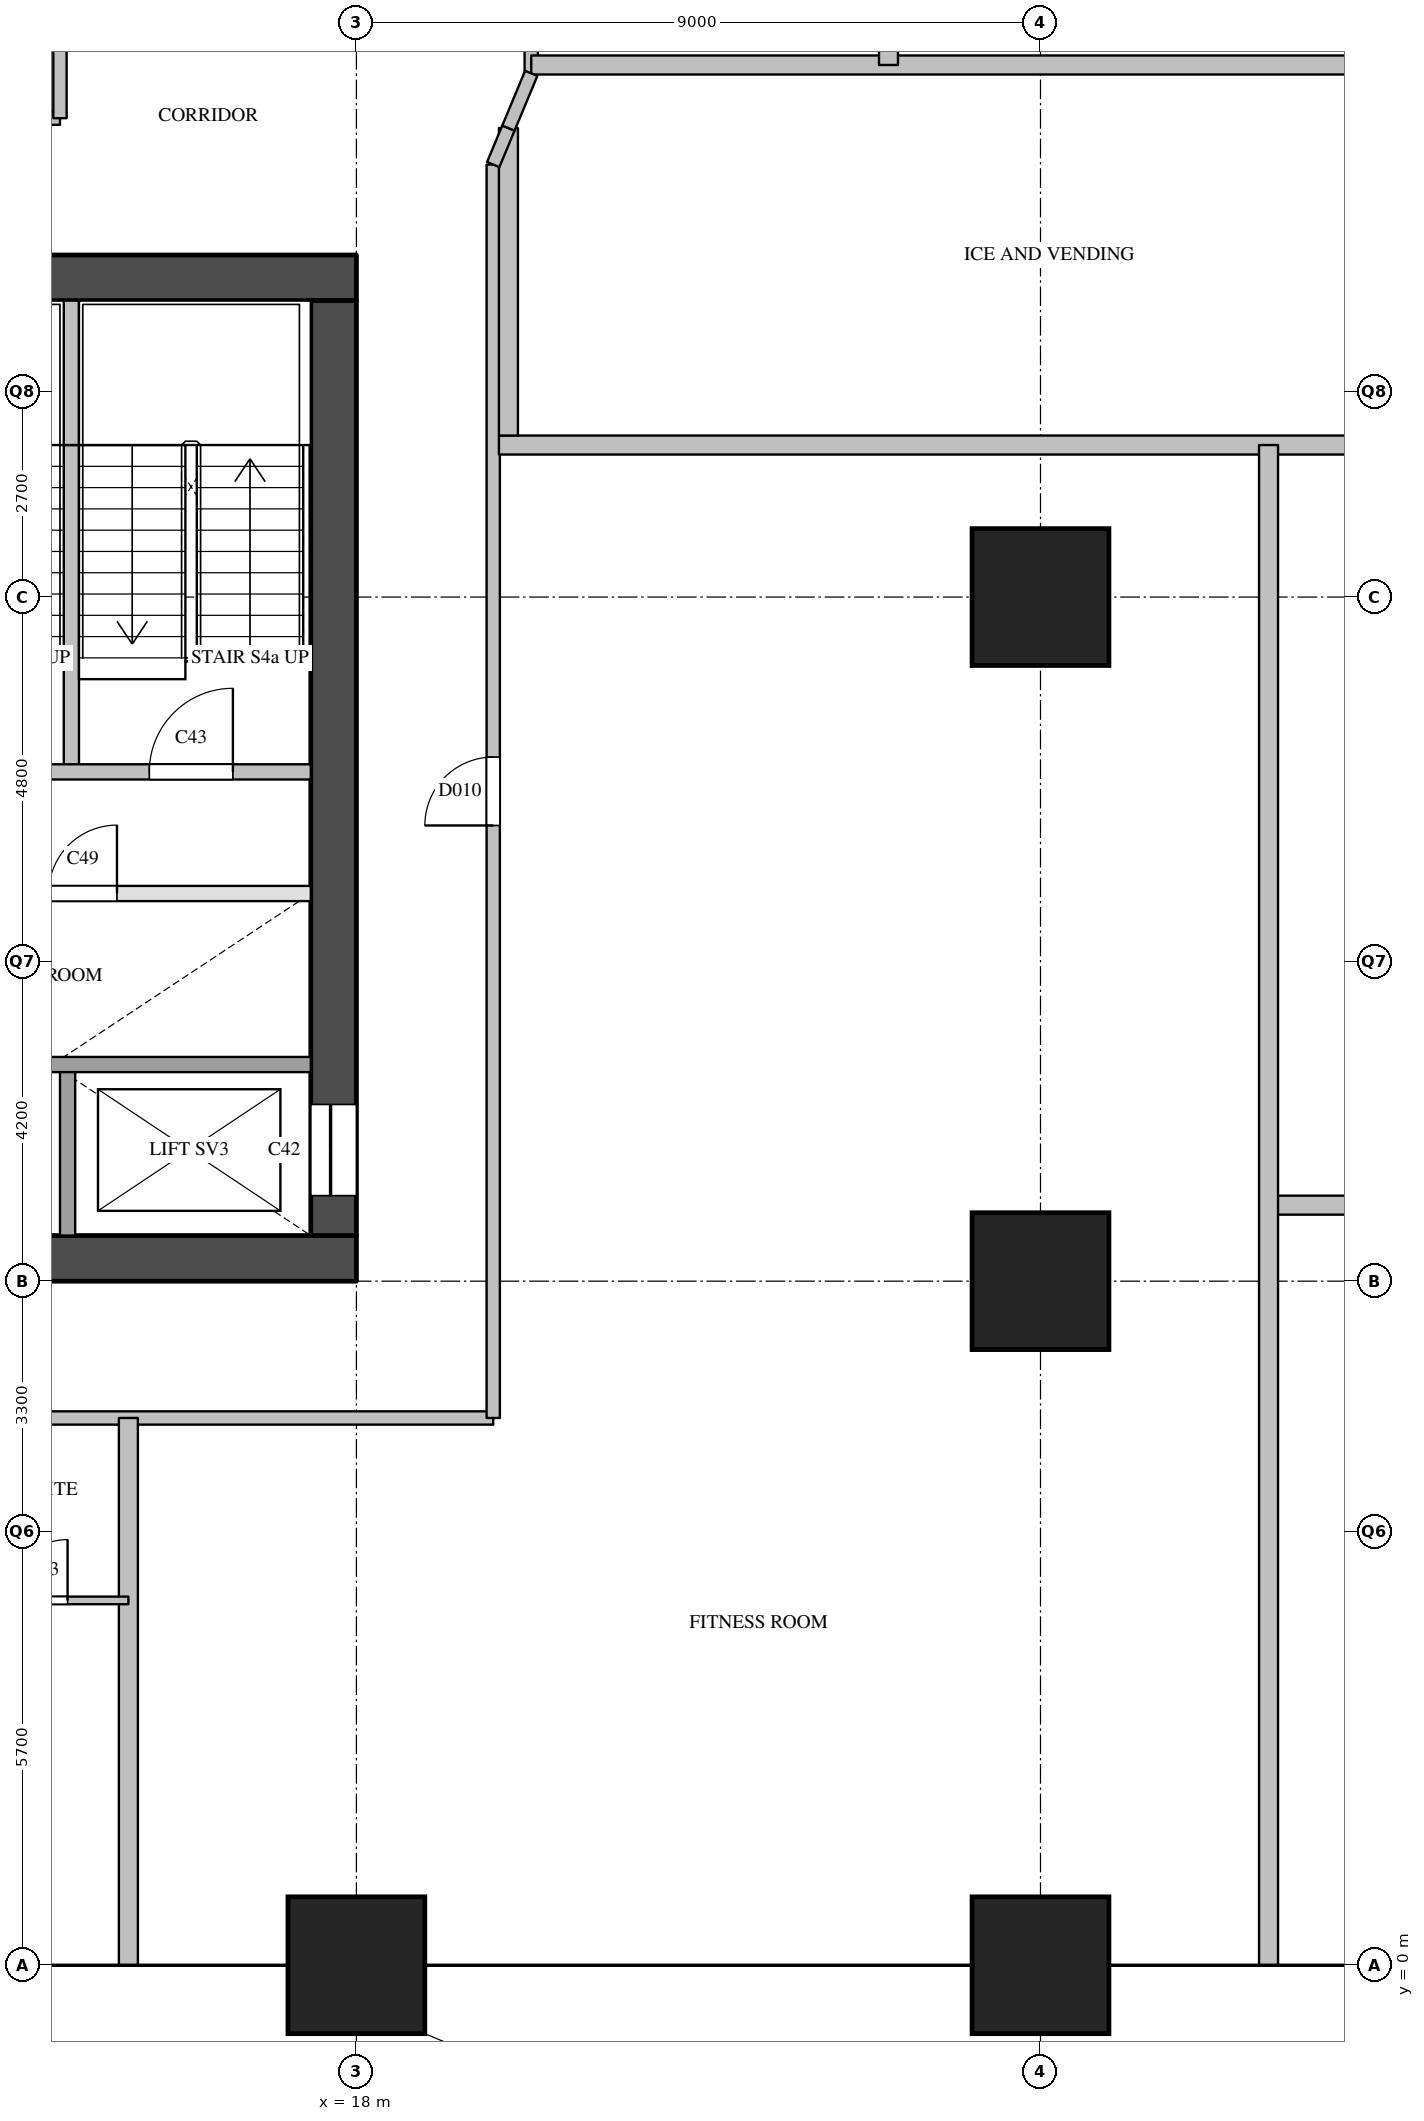
"""IFC4 building model, lengths in metres.
Left out: names, types, materials, properties, quantities, classifications, styles, units other than length and angle.
Written with IfcOpenShell. Run it as: python <this file> out.ifc"""

import sys

from ifc_helpers import new_model, si_unit, direction, frame, frame_2d, origin, origin_2d, place, context, subcontext, project, spatial, rectangle, extrude, element, fill, save


model = new_model("IFC4")
c1 = context("Model", 3, precision=1e-05, world=origin(), true_north=direction((0.0, 1.0)))
c2 = subcontext(c1, "Body", "Model", "MODEL_VIEW")
j1 = project(units=[si_unit("LENGTHUNIT", "METRE"), si_unit("PLANEANGLEUNIT", "RADIAN")], contexts=[c1])
p1 = place(None, origin())
s1 = spatial("IfcSite", under=j1, at=p1, CompositionType="ELEMENT")
p2 = place(p1, origin())
s2 = spatial("IfcBuilding", under=s1, at=p2, CompositionType="ELEMENT")
p3 = place(p2, frame((0.0, 0.0, 42.4)))
s3 = spatial("IfcBuildingStorey", under=s2, at=p3, CompositionType="ELEMENT", Elevation=42.4)
for number, where, z_axis, x_axis in (
    (1, (18.0, 0.0, 0.0), (0.0, 0.0, 1.0), (1.0, 0.0, 0.0)),
    (2, (27.0, 0.0, 0.0), (0.0, 0.0, 1.0), (1.0, 0.0, 0.0)),
    (3, (27.0, 9.0, 0.0), (0.0, 0.0, 1.0), (1.0, 0.0, 0.0)),
    (4, (27.0, 18.0, 0.0), (0.0, 0.0, 1.0), (1.0, 0.0, 0.0)),
):
    element("IfcColumn", number, at=place(p3, frame(where, z_axis=z_axis, x_axis=x_axis)), inside=s3, PredefinedType="COLUMN", context=c2, shape_type="SweptSolid", body=[
        extrude(rectangle(XDim=1.8, YDim=1.8, at=origin_2d()), origin(), (0.0, 0.0, 1.0), 3.8),
    ])
for number, where, z_axis, x_axis in (
    (5, (9.0, 9.3, 0.0), (0.0, 0.0, 1.0), (1.0, 0.0, 0.0)),
    (6, (9.0, 22.2, 0.0), (0.0, 0.0, 1.0), (1.0, 0.0, 0.0)),
):
    element("IfcWall", number, at=place(p3, frame(where, z_axis=z_axis, x_axis=x_axis)), inside=s3, PredefinedType="SHEAR", context=c2, shape_type="SweptSolid", body=[
        extrude(rectangle(XDim=9.0, YDim=0.6, at=frame_2d((4.5, 0.0))), origin(), (0.0, 0.0, 1.0), 3.5),
    ])
p4 = place(p3, frame((17.7, 9.6, 0.0), z_axis=(0.0, 0.0, 1.0), x_axis=(0.0, 1.0, 0.0)))
e7 = element("IfcWall", 7, at=p4, inside=s3, PredefinedType="SHEAR", context=c2, shape_type="SweptSolid", body=[
    extrude(rectangle(XDim=12.3, YDim=0.6, at=frame_2d((6.15, 0.0))), origin(), (0.0, 0.0, 1.0), 3.5),
])
p5 = place(p4, frame((0.525, 0.0, 0.0)))
e8 = element("IfcOpeningElement", 8, at=p5, cuts=e7, PredefinedType="OPENING", context=c2, shape_type="SweptSolid", body=[
    extrude(rectangle(XDim=1.2, YDim=2.1, at=frame_2d((0.6, 1.05))), frame((0.0, 0.31, 0.0), z_axis=(0.0, -1.0, 0.0), x_axis=(1.0, 0.0, 0.0)), (0.0, 0.0, 1.0), 0.62),
])
p6 = place(p3, frame((14.2, 9.6, 0.0), z_axis=(0.0, 0.0, 1.0), x_axis=(0.0, 1.0, 0.0)))
e9 = element("IfcWall", 9, at=p6, inside=s3, PredefinedType="SOLIDWALL", context=c2, shape_type="SweptSolid", body=[
    extrude(rectangle(XDim=2.3, YDim=0.2, at=frame_2d((1.15, 0.0))), origin(), (0.0, 0.0, 1.0), 3.5),
])
p7 = place(p3, frame((14.25, 15.7, 0.0), z_axis=(0.0, 0.0, 1.0), x_axis=(0.0, 1.0, 0.0)))
e10 = element("IfcWall", 10, at=p7, inside=s3, PredefinedType="SOLIDWALL", context=c2, shape_type="SweptSolid", body=[
    extrude(rectangle(XDim=4.3, YDim=0.2, at=frame_2d((2.15, 0.0))), origin(), (0.0, 0.0, 1.0), 3.5),
])
p8 = place(p3, frame((14.25, 20.0, 0.0), z_axis=(0.0, 0.0, 1.0), x_axis=(0.0, 1.0, 0.0)))
e11 = element("IfcWall", 11, at=p8, inside=s3, PredefinedType="SOLIDWALL", context=c2, shape_type="SweptSolid", body=[
    extrude(rectangle(XDim=1.9, YDim=0.2, at=frame_2d((0.95, 0.0))), origin(), (0.0, 0.0, 1.0), 3.5),
])
p9 = place(p3, frame((9.6, 11.85, 0.0), z_axis=(0.0, 0.0, 1.0), x_axis=(1.0, 0.0, 0.0)))
e12 = element("IfcWall", 12, at=p9, inside=s3, PredefinedType="SOLIDWALL", context=c2, shape_type="SweptSolid", body=[
    extrude(rectangle(XDim=7.8, YDim=0.2, at=frame_2d((3.9, 0.0))), origin(), (0.0, 0.0, 1.0), 3.5),
])
p10 = place(p3, frame((11.4, 14.1, 0.0), z_axis=(0.0, 0.0, 1.0), x_axis=(1.0, 0.0, 0.0)))
e13 = element("IfcWall", 13, at=p10, inside=s3, PredefinedType="PARTITIONING", context=c2, shape_type="SweptSolid", body=[
    extrude(rectangle(XDim=6.0, YDim=0.2, at=frame_2d((3.0, 0.0))), origin(), (0.0, 0.0, 1.0), 3.5),
])
p11 = place(p10, frame((2.55, 0.0, 0.0)))
e14 = element("IfcOpeningElement", 14, at=p11, cuts=e13, PredefinedType="OPENING", context=c2, shape_type="SweptSolid", body=[
    extrude(rectangle(XDim=0.9, YDim=2.1, at=frame_2d((0.45, 1.05))), frame((0.0, 0.11, 0.0), z_axis=(0.0, -1.0, 0.0), x_axis=(1.0, 0.0, 0.0)), (0.0, 0.0, 1.0), 0.22),
])
p12 = place(p3, frame((11.1, 15.7, 0.0), z_axis=(0.0, 0.0, 1.0), x_axis=(1.0, 0.0, 0.0)))
e15 = element("IfcWall", 15, at=p12, inside=s3, PredefinedType="SOLIDWALL", context=c2, shape_type="SweptSolid", body=[
    extrude(rectangle(XDim=6.3, YDim=0.2, at=frame_2d((3.15, 0.0))), origin(), (0.0, 0.0, 1.0), 3.5),
])
p13 = place(p12, frame((4.175, 0.0, 0.0)))
e16 = element("IfcOpeningElement", 16, at=p13, cuts=e15, PredefinedType="OPENING", context=c2, shape_type="SweptSolid", body=[
    extrude(rectangle(XDim=1.1, YDim=2.1, at=frame_2d((0.55, 1.05))), frame((0.0, 0.11, 0.0), z_axis=(0.0, -1.0, 0.0), x_axis=(1.0, 0.0, 0.0)), (0.0, 0.0, 1.0), 0.22),
])
p14 = place(p12, frame((1.025, 0.0, 0.0)))
e17 = element("IfcOpeningElement", 17, at=p14, cuts=e15, PredefinedType="OPENING", context=c2, shape_type="SweptSolid", body=[
    extrude(rectangle(XDim=1.1, YDim=2.1, at=frame_2d((0.55, 1.05))), frame((0.0, 0.11, 0.0), z_axis=(0.0, -1.0, 0.0), x_axis=(1.0, 0.0, 0.0)), (0.0, 0.0, 1.0), 0.22),
])
p15 = place(p3, frame((7.2, 7.2, 0.0), z_axis=(0.0, 0.0, 1.0), x_axis=(1.0, 0.0, 0.0)))
e18 = element("IfcWall", 18, at=p15, inside=s3, PredefinedType="PARTITIONING", context=c2, shape_type="SweptSolid", body=[
    extrude(rectangle(XDim=12.6, YDim=0.175, at=frame_2d((6.3, 0.0))), origin(), (0.0, 0.0, 1.0), 3.5),
])
p16 = place(p15, frame((3.6, 0.0, 0.0)))
e19 = element("IfcOpeningElement", 19, at=p16, cuts=e18, PredefinedType="OPENING", context=c2, shape_type="SweptSolid", body=[
    extrude(rectangle(XDim=1.0, YDim=2.1, at=frame_2d((0.5, 1.05))), frame((0.0, 0.097, 0.0), z_axis=(0.0, -1.0, 0.0), x_axis=(1.0, 0.0, 0.0)), (0.0, 0.0, 1.0), 0.195),
])
p17 = place(p15, frame((0.95, 0.0, 0.0)))
e20 = element("IfcOpeningElement", 20, at=p17, cuts=e18, PredefinedType="OPENING", context=c2, shape_type="SweptSolid", body=[
    extrude(rectangle(XDim=0.9, YDim=2.1, at=frame_2d((0.45, 1.05))), frame((0.0, 0.097, 0.0), z_axis=(0.0, -1.0, 0.0), x_axis=(1.0, 0.0, 0.0)), (0.0, 0.0, 1.0), 0.195),
])
p18 = place(p3, frame((11.32, 24.3, 0.0), z_axis=(0.0, 0.0, 1.0), x_axis=(1.0, 0.0, 0.0)))
e21 = element("IfcWall", 21, at=p18, inside=s3, PredefinedType="PARTITIONING", context=c2, shape_type="SweptSolid", body=[
    extrude(rectangle(XDim=2.78, YDim=0.175, at=frame_2d((1.39, 0.0))), origin(), (0.0, 0.0, 1.0), 3.5),
])
p19 = place(p18, frame((0.89, 0.0, 0.0)))
e22 = element("IfcOpeningElement", 22, at=p19, cuts=e21, PredefinedType="OPENING", context=c2, shape_type="SweptSolid", body=[
    extrude(rectangle(XDim=1.0, YDim=2.1, at=frame_2d((0.5, 1.05))), frame((0.0, 0.097, 0.0), z_axis=(0.0, -1.0, 0.0), x_axis=(1.0, 0.0, 0.0)), (0.0, 0.0, 1.0), 0.195),
])
p20 = place(p3, frame((14.1, 24.3, 0.0), z_axis=(0.0, 0.0, 1.0), x_axis=(0.0, 1.0, 0.0)))
e23 = element("IfcWall", 23, at=p20, inside=s3, PredefinedType="PARTITIONING", context=c2, shape_type="SweptSolid", body=[
    extrude(rectangle(XDim=2.4, YDim=0.175, at=frame_2d((1.2, 0.0))), origin(), (0.0, 0.0, 1.0), 2.5),
])
p21 = place(p3, frame((19.8, 7.2, 0.0), z_axis=(0.0, 0.0, 1.0), x_axis=(0.0, 1.0, 0.0)))
e24 = element("IfcWall", 24, at=p21, inside=s3, PredefinedType="PARTITIONING", context=c2, shape_type="SweptSolid", body=[
    extrude(rectangle(XDim=16.49, YDim=0.175, at=frame_2d((8.245, 0.0))), origin(), (0.0, 0.0, 1.0), 3.5),
])
p22 = place(p21, frame((7.795, 0.0, 0.0)))
e25 = element("IfcOpeningElement", 25, at=p22, cuts=e24, PredefinedType="OPENING", context=c2, shape_type="SweptSolid", body=[
    extrude(rectangle(XDim=0.9, YDim=2.1, at=frame_2d((0.45, 1.05))), frame((0.0, 0.097, 0.0), z_axis=(0.0, -1.0, 0.0), x_axis=(1.0, 0.0, 0.0)), (0.0, 0.0, 1.0), 0.195),
])
p23 = place(p3, frame((20.3, 24.89, 0.0), z_axis=(0.0, 0.0, 1.0), x_axis=(0.0, 1.0, 0.0)))
e26 = element("IfcWall", 26, at=p23, inside=s3, PredefinedType="PARTITIONING", context=c2, shape_type="SweptSolid", body=[
    extrude(rectangle(XDim=3.03, YDim=0.175, at=frame_2d((1.515, 0.0))), origin(), (0.0, 0.0, 1.0), 2.5),
])
p24 = place(p3, frame((30.0, 10.0, 0.0), z_axis=(0.0, 0.0, 1.0), x_axis=(1.0, 0.0, 0.0)))
e27 = element("IfcWall", 27, at=p24, inside=s3, PredefinedType="PARTITIONING", context=c2, shape_type="SweptSolid", body=[
    extrude(rectangle(XDim=4.2, YDim=0.25, at=frame_2d((2.1, 0.0))), origin(), (0.0, 0.0, 1.0), 3.5),
])
p25 = place(p3, frame((19.875, 20.0, 0.0), z_axis=(0.0, 0.0, 1.0), x_axis=(1.0, 0.0, 0.0)))
e28 = element("IfcWall", 28, at=p25, inside=s3, PredefinedType="PARTITIONING", context=c2, shape_type="SweptSolid", body=[
    extrude(rectangle(XDim=14.325, YDim=0.25, at=frame_2d((7.163, 0.0))), origin(), (0.0, 0.0, 1.0), 2.5),
])
p26 = place(p3, frame((20.3, 25.0, 0.0), z_axis=(0.0, 0.0, 1.0), x_axis=(1.0, 0.0, 0.0)))
e29 = element("IfcWall", 29, at=p26, inside=s3, PredefinedType="PARTITIONING", context=c2, shape_type="SweptSolid", body=[
    extrude(rectangle(XDim=13.4, YDim=0.25, at=frame_2d((6.7, 0.0))), origin(), (0.0, 0.0, 1.0), 2.5),
])
p27 = place(p3, frame((15.0, 0.0, 0.0), z_axis=(0.0, 0.0, 1.0), x_axis=(0.0, 1.0, 0.0)))
e30 = element("IfcWall", 30, at=p27, inside=s3, PredefinedType="PARTITIONING", context=c2, shape_type="SweptSolid", body=[
    extrude(rectangle(XDim=7.2, YDim=0.25, at=frame_2d((3.6, 0.0))), origin(), (0.0, 0.0, 1.0), 2.5),
])
p28 = place(p3, frame((20.0, 20.125, 0.0), z_axis=(0.0, 0.0, 1.0), x_axis=(0.0, 1.0, 0.0)))
e31 = element("IfcWall", 31, at=p28, inside=s3, PredefinedType="PARTITIONING", context=c2, shape_type="SweptSolid", body=[
    extrude(rectangle(XDim=4.045, YDim=0.25, at=frame_2d((2.022, 0.0))), origin(), (0.0, 0.0, 1.0), 3.5),
])
p29 = place(p3, frame((25.0, 25.0, 0.0), z_axis=(0.0, 0.0, 1.0), x_axis=(0.0, 1.0, 0.0)))
e32 = element("IfcWall", 32, at=p29, inside=s3, PredefinedType="PARTITIONING", context=c2, shape_type="SweptSolid", body=[
    extrude(rectangle(XDim=29.0, YDim=0.25, at=frame_2d((14.5, 0.0))), origin(), (0.0, 0.0, 1.0), 2.5),
])
p30 = place(p3, frame((30.0, 0.0, 0.0), z_axis=(0.0, 0.0, 1.0), x_axis=(0.0, 1.0, 0.0)))
e33 = element("IfcWall", 33, at=p30, inside=s3, PredefinedType="PARTITIONING", context=c2, shape_type="SweptSolid", body=[
    extrude(rectangle(XDim=20.0, YDim=0.25, at=frame_2d((10.0, 0.0))), origin(), (0.0, 0.0, 1.0), 2.5),
])
p31 = place(p3, frame((12.6, 4.8, 0.0), z_axis=(0.0, 0.0, 1.0), x_axis=(1.0, 0.0, 0.0)))
e34 = element("IfcWall", 34, at=p31, inside=s3, PredefinedType="PARTITIONING", context=c2, shape_type="SweptSolid", body=[
    extrude(rectangle(XDim=2.4, YDim=0.1, at=frame_2d((1.2, 0.0))), origin(), (0.0, 0.0, 1.0), 3.5),
])
p32 = place(p31, frame((0.8, 0.0, 0.0)))
e35 = element("IfcOpeningElement", 35, at=p32, cuts=e34, PredefinedType="OPENING", context=c2, shape_type="SweptSolid", body=[
    extrude(rectangle(XDim=0.8, YDim=2.1, at=frame_2d((0.4, 1.05))), frame((0.0, 0.06, 0.0), z_axis=(0.0, -1.0, 0.0), x_axis=(1.0, 0.0, 0.0)), (0.0, 0.0, 1.0), 0.12),
])
p33 = place(p3, frame((20.0, 24.17, 0.0), z_axis=(0.0, 0.0, 1.0), x_axis=(-0.384548704165, -0.923104703771, 0.0)))
e36 = element("IfcWall", 36, at=p33, inside=s3, PredefinedType="PARTITIONING", context=c2, shape_type="SweptSolid", body=[
    extrude(rectangle(XDim=0.52, YDim=0.175, at=frame_2d((0.26, 0.0))), origin(), (0.0, 0.0, 1.0), 3.5),
])
p34 = place(p3, frame((20.3, 24.89, 0.0), z_axis=(0.0, 0.0, 1.0), x_axis=(-0.384682059045, -0.923049139238, 0.0)))
e37 = element("IfcWall", 37, at=p34, inside=s3, PredefinedType="PARTITIONING", context=c2, shape_type="SweptSolid", body=[
    extrude(rectangle(XDim=0.78, YDim=0.175, at=frame_2d((0.39, 0.0))), origin(), (0.0, 0.0, 1.0), 3.5),
])
p35 = place(p5, origin())
e38 = element("IfcDoor", 38, at=p35, inside=s3, OperationType="SLIDING_TO_LEFT", PredefinedType="DOOR", context=c2, shape_type="SweptSolid", body=[
    extrude(rectangle(XDim=1.2, YDim=2.1, at=frame_2d((0.6, 1.05))), frame((0.0, 0.025, 0.0), z_axis=(0.0, -1.0, 0.0), x_axis=(1.0, 0.0, 0.0)), (0.0, 0.0, 1.0), 0.05),
])
fill(e8, e38)
p36 = place(p13, origin())
e39 = element("IfcDoor", 39, at=p36, inside=s3, OperationType="SINGLE_SWING_RIGHT", PredefinedType="DOOR", context=c2, shape_type="SweptSolid", body=[
    extrude(rectangle(XDim=1.1, YDim=2.1, at=frame_2d((0.55, 1.05))), frame((0.0, 0.025, 0.0), z_axis=(0.0, -1.0, 0.0), x_axis=(1.0, 0.0, 0.0)), (0.0, 0.0, 1.0), 0.05),
])
fill(e16, e39)
p37 = place(p11, origin())
e40 = element("IfcDoor", 40, at=p37, inside=s3, OperationType="SINGLE_SWING_RIGHT", PredefinedType="DOOR", context=c2, shape_type="SweptSolid", body=[
    extrude(rectangle(XDim=0.9, YDim=2.1, at=frame_2d((0.45, 1.05))), frame((0.0, 0.025, 0.0), z_axis=(0.0, -1.0, 0.0), x_axis=(1.0, 0.0, 0.0)), (0.0, 0.0, 1.0), 0.05),
])
fill(e14, e40)
p38 = place(p32, origin())
e41 = element("IfcDoor", 41, at=p38, inside=s3, OperationType="SINGLE_SWING_RIGHT", PredefinedType="DOOR", context=c2, shape_type="SweptSolid", body=[
    extrude(rectangle(XDim=0.8, YDim=2.1, at=frame_2d((0.4, 1.05))), frame((0.0, 0.025, 0.0), z_axis=(0.0, -1.0, 0.0), x_axis=(1.0, 0.0, 0.0)), (0.0, 0.0, 1.0), 0.05),
])
fill(e35, e41)
p39 = place(p22, origin())
e42 = element("IfcDoor", 42, at=p39, inside=s3, OperationType="SINGLE_SWING_LEFT", PredefinedType="DOOR", context=c2, shape_type="SweptSolid", body=[
    extrude(rectangle(XDim=0.9, YDim=2.1, at=frame_2d((0.45, 1.05))), frame((0.0, 0.025, 0.0), z_axis=(0.0, -1.0, 0.0), x_axis=(1.0, 0.0, 0.0)), (0.0, 0.0, 1.0), 0.05),
])
fill(e25, e42)
save(model, sys.argv[1])
